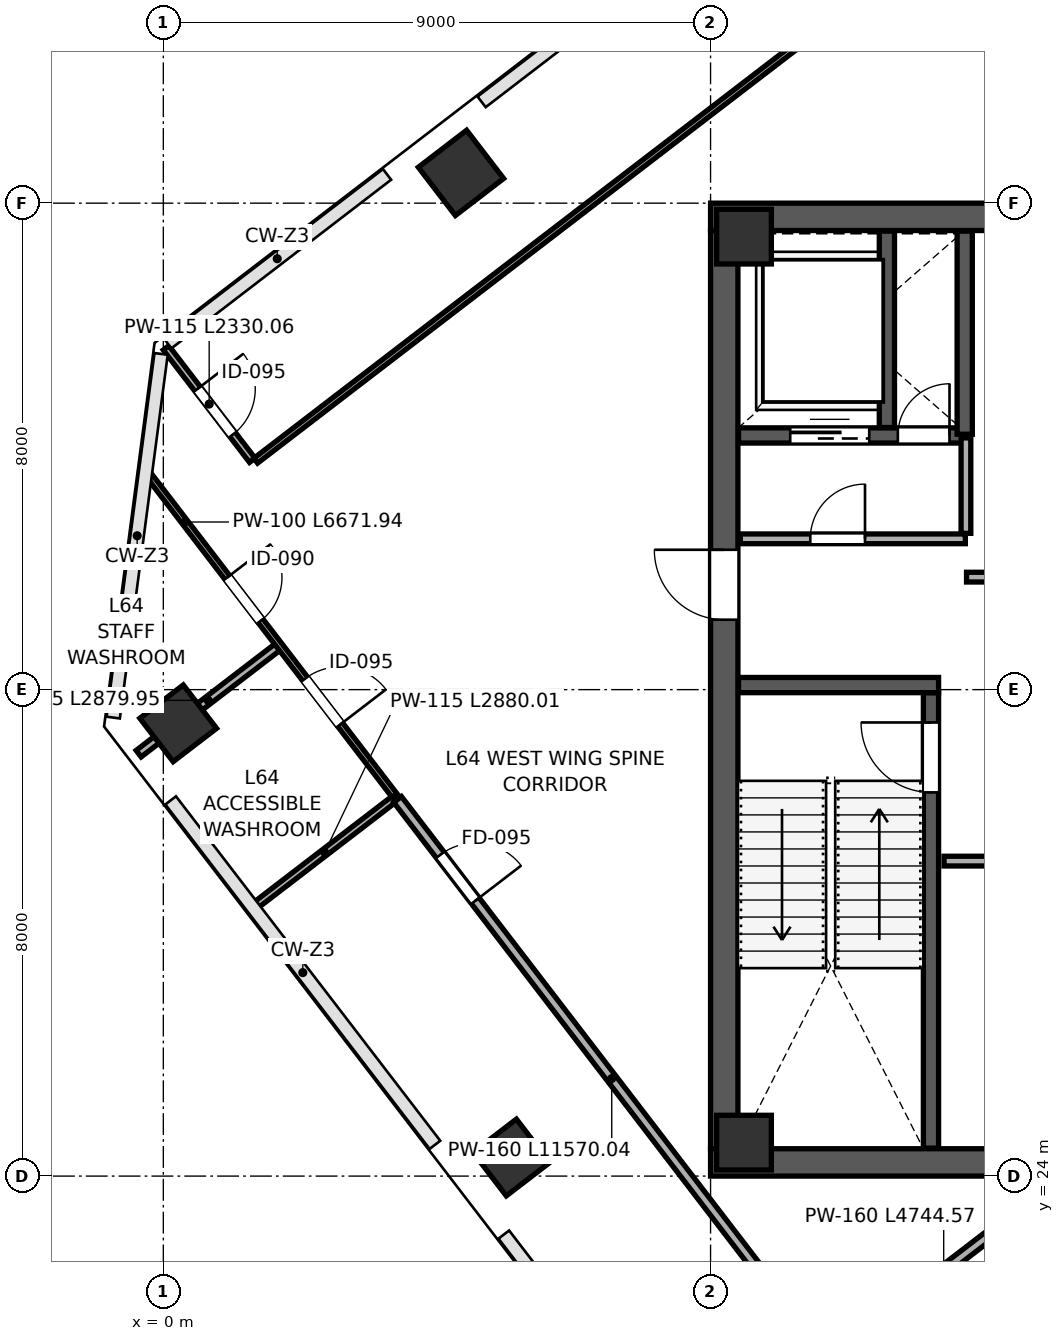
"""IFC4 building model, lengths in metres.
Left out: names, types, materials, properties, quantities, classifications, styles, units other than length and angle.
Written with IfcOpenShell. Run it as: python <this file> out.ifc"""

import sys

from ifc_helpers import new_model, si_unit, direction, frame, frame_2d, origin, origin_2d, place, context, subcontext, project, spatial, rectangle, extrude, source, transform, mapped, element, fill, save


model = new_model("IFC4")
c1 = context("Model", 3, precision=1e-05, world=origin(), true_north=direction((0.0, 1.0)))
c2 = subcontext(c1, "Body", "Model", "MODEL_VIEW")
j1 = project(units=[si_unit("LENGTHUNIT", "METRE"), si_unit("PLANEANGLEUNIT", "RADIAN")], contexts=[c1])
p1 = place(None, origin())
s1 = spatial("IfcSite", under=j1, at=p1, CompositionType="ELEMENT")
p2 = place(p1, origin())
s2 = spatial("IfcBuilding", under=s1, at=p2, CompositionType="ELEMENT")
p3 = place(p2, frame((0.0, 0.0, 283.6)))
s3 = spatial("IfcBuildingStorey", under=s2, at=p3, CompositionType="ELEMENT", Elevation=283.6)
m1 = source(origin(), c2, "Body", "SweptSolid", [
    extrude(rectangle(XDim=0.9, YDim=0.9, at=origin_2d()), origin(), (0.0, 0.0, 1.0), 4.198),
])
for number, where, z_axis, x_axis in (
    (1, (9.55, 24.55, 0.001), (0.0, 0.0, 1.0), (1.0, 0.0, 0.0)),
    (2, (9.55, 39.45, 0.001), (0.0, 0.0, 1.0), (1.0, 0.0, 0.0)),
):
    element("IfcColumn", number, at=place(p3, frame(where, z_axis=z_axis, x_axis=x_axis)), inside=s3, PredefinedType="COLUMN", context=c2, shape_type="MappedRepresentation", body=[
        mapped(m1, transform((0.0, 0.0, 0.0), scale=1.0)),
    ])
m2 = source(origin(), c2, "Body", "SweptSolid", [
    extrude(rectangle(XDim=0.9, YDim=0.9, at=origin_2d()), origin(), (0.0, 0.0, 1.0), 4.198),
])
for number, where, z_axis, x_axis in (
    (3, (0.245, 31.446, 0.001), (0.0, 0.0, 1.0), (-0.609, 0.793, 0.0)),
    (4, (5.724, 24.306, 0.001), (0.0, 0.0, 1.0), (-0.609, 0.793, 0.0)),
):
    element("IfcColumn", number, at=place(p3, frame(where, z_axis=z_axis, x_axis=x_axis)), inside=s3, PredefinedType="COLUMN", context=c2, shape_type="MappedRepresentation", body=[
        mapped(m2, transform((0.0, 0.0, 0.0), scale=1.0)),
    ])
m3 = source(origin(), c2, "Body", "SweptSolid", [
    extrude(rectangle(XDim=1.0, YDim=1.0, at=origin_2d()), origin(), (0.0, 0.0, 1.0), 4.198),
])
p4 = place(p3, frame((4.896, 40.498, 0.001), z_axis=(0.0, 0.0, 1.0), x_axis=(-0.608761429009, 0.793353340291, 0.0)))
e5 = element("IfcColumn", 5, at=p4, inside=s3, PredefinedType="COLUMN", context=c2, shape_type="MappedRepresentation", body=[
    mapped(m3, transform((0.0, 0.0, 0.0), scale=1.0)),
])
p5 = place(p3, frame((9.225, 24.45, 0.0), z_axis=(0.0, 0.0, 1.0), x_axis=(0.0, 1.0, 0.0)))
e6 = element("IfcWall", 6, at=p5, inside=s3, PredefinedType="SHEAR", context=c2, shape_type="SweptSolid", body=[
    extrude(rectangle(XDim=15.1, YDim=0.45, at=frame_2d((7.55, 0.0))), origin(), (0.0, 0.0, 1.0), 3.92),
])
p6 = place(p5, frame((8.7, 0.0, 0.0)))
e7 = element("IfcOpeningElement", 7, at=p6, cuts=e6, PredefinedType="OPENING", context=c2, shape_type="SweptSolid", body=[
    extrude(rectangle(XDim=1.15, YDim=2.2, at=frame_2d((0.575, 1.1))), frame((0.0, 0.235, 0.0), z_axis=(0.0, -1.0, 0.0), x_axis=(1.0, 0.0, 0.0)), (0.0, 0.0, 1.0), 0.47),
])
for number, where, z_axis, x_axis in (
    (8, (9.0, 24.225, 0.0), (0.0, 0.0, 1.0), (1.0, 0.0, 0.0)),
    (9, (9.0, 39.775, 0.0), (0.0, 0.0, 1.0), (1.0, 0.0, 0.0)),
):
    element("IfcWall", number, at=place(p3, frame(where, z_axis=z_axis, x_axis=x_axis)), inside=s3, PredefinedType="SHEAR", context=c2, shape_type="SweptSolid", body=[
        extrude(rectangle(XDim=18.0, YDim=0.45, at=frame_2d((9.0, 0.0))), origin(), (0.0, 0.0, 1.0), 3.92),
    ])
p7 = place(p3, frame((12.625, 24.46, 0.0), z_axis=(0.0, 0.0, 1.0), x_axis=(0.0, 1.0, 0.0)))
e10 = element("IfcWall", 10, at=p7, inside=s3, PredefinedType="SHEAR", context=c2, shape_type="SweptSolid", body=[
    extrude(rectangle(XDim=7.49, YDim=0.25, at=frame_2d((3.745, 0.0))), origin(), (0.0, 0.0, 1.0), 3.92),
])
p8 = place(p7, frame((5.85, 0.0, 0.0)))
e11 = element("IfcOpeningElement", 11, at=p8, cuts=e10, PredefinedType="OPENING", context=c2, shape_type="SweptSolid", body=[
    extrude(rectangle(XDim=1.15, YDim=2.2, at=frame_2d((0.575, 1.1))), frame((0.0, 0.135, 0.0), z_axis=(0.0, -1.0, 0.0), x_axis=(1.0, 0.0, 0.0)), (0.0, 0.0, 1.0), 0.27),
])
p9 = place(p3, frame((9.46, 32.075, 0.0), z_axis=(0.0, 0.0, 1.0), x_axis=(1.0, 0.0, 0.0)))
e12 = element("IfcWall", 12, at=p9, inside=s3, PredefinedType="SHEAR", context=c2, shape_type="SweptSolid", body=[
    extrude(rectangle(XDim=3.29, YDim=0.25, at=frame_2d((1.645, 0.0))), origin(), (0.0, 0.0, 1.0), 3.92),
])
p10 = place(p3, frame((9.46, 36.18, 0.0), z_axis=(0.0, 0.0, 1.0), x_axis=(1.0, 0.0, 0.0)))
e13 = element("IfcWall", 13, at=p10, inside=s3, PredefinedType="SHEAR", context=c2, shape_type="SweptSolid", body=[
    extrude(rectangle(XDim=3.79, YDim=0.25, at=frame_2d((1.895, 0.0))), origin(), (0.0, 0.0, 1.0), 3.92),
])
p11 = place(p10, frame((2.62, 0.0, 0.0)))
e14 = element("IfcOpeningElement", 14, at=p11, cuts=e13, PredefinedType="OPENING", context=c2, shape_type="SweptSolid", body=[
    extrude(rectangle(XDim=0.85, YDim=2.1, at=frame_2d((0.425, 1.05))), frame((0.0, 0.135, 0.0), z_axis=(0.0, -1.0, 0.0), x_axis=(1.0, 0.0, 0.0)), (0.0, 0.0, 1.0), 0.27),
])
p12 = place(p10, frame((0.85, 0.0, 0.0)))
e15 = element("IfcOpeningElement", 15, at=p12, cuts=e13, PredefinedType="OPENING", context=c2, shape_type="SweptSolid", body=[
    extrude(rectangle(XDim=1.3, YDim=2.25, at=frame_2d((0.65, 1.125))), frame((0.0, 0.135, 0.0), z_axis=(0.0, -1.0, 0.0), x_axis=(1.0, 0.0, 0.0)), (0.0, 0.0, 1.0), 0.27),
])
p13 = place(p3, frame((11.9, 36.31, 0.0), z_axis=(0.0, 0.0, 1.0), x_axis=(0.0, 1.0, 0.0)))
e16 = element("IfcWall", 16, at=p13, inside=s3, PredefinedType="SHEAR", context=c2, shape_type="SweptSolid", body=[
    extrude(rectangle(XDim=3.23, YDim=0.25, at=frame_2d((1.615, 0.0))), origin(), (0.0, 0.0, 1.0), 3.92),
])
p14 = place(p3, frame((13.18, 36.2, 0.0), z_axis=(0.0, 0.0, 1.0), x_axis=(0.0, 1.0, 0.0)))
e17 = element("IfcWall", 17, at=p14, inside=s3, PredefinedType="SHEAR", context=c2, shape_type="SweptSolid", body=[
    extrude(rectangle(XDim=3.34, YDim=0.25, at=frame_2d((1.67, 0.0))), origin(), (0.0, 0.0, 1.0), 3.92),
])
p15 = place(p3, frame((9.49, 34.48, 0.0), z_axis=(0.0, 0.0, 1.0), x_axis=(1.0, 0.0, 0.0)))
e18 = element("IfcWall", 18, at=p15, inside=s3, PredefinedType="PARTITIONING", context=c2, shape_type="SweptSolid", body=[
    extrude(rectangle(XDim=3.7, YDim=0.16, at=frame_2d((1.85, 0.0))), origin(), (0.0, 0.0, 1.0), 3.92),
])
p16 = place(p15, frame((1.15, 0.0, 0.0)))
e19 = element("IfcOpeningElement", 19, at=p16, cuts=e18, PredefinedType="OPENING", context=c2, shape_type="SweptSolid", body=[
    extrude(rectangle(XDim=0.9, YDim=2.15, at=frame_2d((0.45, 1.075))), frame((0.0, 0.09, 0.0), z_axis=(0.0, -1.0, 0.0), x_axis=(1.0, 0.0, 0.0)), (0.0, 0.0, 1.0), 0.18),
])
p17 = place(p3, frame((13.2, 34.57, 0.0), z_axis=(0.0, 0.0, 1.0), x_axis=(0.0, 1.0, 0.0)))
e20 = element("IfcWall", 20, at=p17, inside=s3, PredefinedType="PARTITIONING", context=c2, shape_type="SweptSolid", body=[
    extrude(rectangle(XDim=1.57, YDim=0.16, at=frame_2d((0.785, 0.0))), origin(), (0.0, 0.0, 1.0), 3.92),
])
p18 = place(p3, frame((13.21, 33.85, 0.0), z_axis=(0.0, 0.0, 1.0), x_axis=(1.0, 0.0, 0.0)))
e21 = element("IfcWall", 21, at=p18, inside=s3, PredefinedType="PARTITIONING", context=c2, shape_type="SweptSolid", body=[
    extrude(rectangle(XDim=4.1, YDim=0.16, at=frame_2d((2.05, 0.0))), origin(), (0.0, 0.0, 1.0), 3.92),
])
p19 = place(p18, frame((1.35, 0.0, 0.0)))
e22 = element("IfcOpeningElement", 22, at=p19, cuts=e21, PredefinedType="OPENING", context=c2, shape_type="SweptSolid", body=[
    extrude(rectangle(XDim=0.9, YDim=2.15, at=frame_2d((0.45, 1.075))), frame((0.0, 0.09, 0.0), z_axis=(0.0, -1.0, 0.0), x_axis=(1.0, 0.0, 0.0)), (0.0, 0.0, 1.0), 0.18),
])
p20 = place(p3, frame((12.84, 29.18, 0.0), z_axis=(0.0, 0.0, 1.0), x_axis=(1.0, 0.0, 0.0)))
e23 = element("IfcWall", 23, at=p20, inside=s3, PredefinedType="PARTITIONING", context=c2, shape_type="SweptSolid", body=[
    extrude(rectangle(XDim=8.37, YDim=0.16, at=frame_2d((4.185, 0.0))), origin(), (0.0, 0.0, 1.0), 3.92),
])
p21 = place(p20, frame((2.6, 0.0, 0.0)))
e24 = element("IfcOpeningElement", 24, at=p21, cuts=e23, PredefinedType="OPENING", context=c2, shape_type="SweptSolid", body=[
    extrude(rectangle(XDim=0.9, YDim=2.15, at=frame_2d((0.45, 1.075))), frame((0.0, 0.09, 0.0), z_axis=(0.0, -1.0, 0.0), x_axis=(1.0, 0.0, 0.0)), (0.0, 0.0, 1.0), 0.18),
])
p22 = place(p3, frame((-0.406, 30.947, 0.0), z_axis=(0.0, 0.0, 1.0), x_axis=(0.793370260172, 0.608739377956, 0.0)))
e25 = element("IfcWall", 25, at=p22, inside=s3, PredefinedType="PARTITIONING", context=c2, shape_type="SweptSolid", body=[
    extrude(rectangle(XDim=2.88, YDim=0.135, at=frame_2d((1.44, 0.0))), origin(), (0.0, 0.0, 1.0), 3.155),
])
p23 = place(p3, frame((1.512, 28.448, 0.0), z_axis=(0.0, 0.0, 1.0), x_axis=(0.793370260172, 0.608739377956, 0.0)))
e26 = element("IfcWall", 26, at=p23, inside=s3, PredefinedType="PARTITIONING", context=c2, shape_type="SweptSolid", body=[
    extrude(rectangle(XDim=2.88, YDim=0.115, at=frame_2d((1.44, 0.0))), origin(), (0.0, 0.0, 1.0), 3.155),
])
p24 = place(p3, frame((-0.258, 35.551, 0.0), z_axis=(0.0, 0.0, 1.0), x_axis=(0.608751837986, -0.79336069965, 0.0)))
e27 = element("IfcWall", 27, at=p24, inside=s3, PredefinedType="PARTITIONING", context=c2, shape_type="SweptSolid", body=[
    extrude(rectangle(XDim=6.672, YDim=0.1, at=frame_2d((3.336, 0.0))), origin(), (0.0, 0.0, 1.0), 3.92),
])
p25 = place(p24, frame((2.15, 0.0, 0.0)))
e28 = element("IfcOpeningElement", 28, at=p25, cuts=e27, PredefinedType="OPENING", context=c2, shape_type="SweptSolid", body=[
    extrude(rectangle(XDim=0.9, YDim=2.15, at=frame_2d((0.45, 1.075))), frame((0.0, 0.06, 0.0), z_axis=(0.0, -1.0, 0.0), x_axis=(1.0, 0.0, 0.0)), (0.0, 0.0, 1.0), 0.12),
])
p26 = place(p24, frame((4.25, 0.0, 0.0)))
e29 = element("IfcOpeningElement", 29, at=p26, cuts=e27, PredefinedType="OPENING", context=c2, shape_type="SweptSolid", body=[
    extrude(rectangle(XDim=0.95, YDim=2.15, at=frame_2d((0.475, 1.075))), frame((0.0, 0.06, 0.0), z_axis=(0.0, -1.0, 0.0), x_axis=(1.0, 0.0, 0.0)), (0.0, 0.0, 1.0), 0.12),
])
p27 = place(p3, frame((3.853, 30.194, 0.0), z_axis=(0.0, 0.0, 1.0), x_axis=(0.608748677634, -0.793363124603, 0.0)))
e30 = element("IfcWall", 30, at=p27, inside=s3, PredefinedType="PARTITIONING", context=c2, shape_type="SweptSolid", body=[
    extrude(rectangle(XDim=11.57, YDim=0.16, at=frame_2d((5.785, 0.0))), origin(), (0.0, 0.0, 1.0), 3.92),
])
p28 = place(p27, frame((1.15, 0.0, 0.0)))
e31 = element("IfcOpeningElement", 31, at=p28, cuts=e30, PredefinedType="OPENING", context=c2, shape_type="SweptSolid", body=[
    extrude(rectangle(XDim=0.95, YDim=2.15, at=frame_2d((0.475, 1.075))), frame((0.0, 0.09, 0.0), z_axis=(0.0, -1.0, 0.0), x_axis=(1.0, 0.0, 0.0)), (0.0, 0.0, 1.0), 0.18),
])
p29 = place(p3, frame((10.952, 21.007, 0.0), z_axis=(0.0, 0.0, 1.0), x_axis=(0.793369431695, 0.608740457709, 0.0)))
e32 = element("IfcWall", 32, at=p29, inside=s3, PredefinedType="PARTITIONING", context=c2, shape_type="SweptSolid", body=[
    extrude(rectangle(XDim=4.745, YDim=0.16, at=frame_2d((2.372, 0.0))), origin(), (0.0, 0.0, 1.0), 3.92),
])
p30 = place(p3, frame((0.045, 37.62, 0.0), z_axis=(0.0, 0.0, 1.0), x_axis=(0.60874824263, -0.793363458381, 0.0)))
e33 = element("IfcWall", 33, at=p30, inside=s3, PredefinedType="PARTITIONING", context=c2, shape_type="SweptSolid", body=[
    extrude(rectangle(XDim=2.33, YDim=0.115, at=frame_2d((1.165, 0.0))), origin(), (0.0, 0.0, 1.0), 3.92),
])
p31 = place(p30, frame((0.85, 0.0, 0.0)))
e34 = element("IfcOpeningElement", 34, at=p31, cuts=e33, PredefinedType="OPENING", context=c2, shape_type="SweptSolid", body=[
    extrude(rectangle(XDim=0.95, YDim=2.15, at=frame_2d((0.475, 1.075))), frame((0.0, 0.067, 0.0), z_axis=(0.0, -1.0, 0.0), x_axis=(1.0, 0.0, 0.0)), (0.0, 0.0, 1.0), 0.135),
])
p32 = place(p3, frame((1.519, 35.764, 0.0), z_axis=(0.0, 0.0, 1.0), x_axis=(0.793353184068, 0.608761632602, 0.0)))
e35 = element("IfcWall", 35, at=p32, inside=s3, PredefinedType="PARTITIONING", context=c2, shape_type="SweptSolid", body=[
    extrude(rectangle(XDim=27.572, YDim=0.1, at=frame_2d((13.786, 0.0))), origin(), (0.0, 0.0, 1.0), 3.92),
])
m4 = source(origin(), c2, "Body", "SweptSolid", [
    extrude(rectangle(XDim=1.15, YDim=2.2, at=frame_2d((0.575, 1.1))), frame((0.0, 0.025, 0.0), z_axis=(0.0, -1.0, 0.0), x_axis=(1.0, 0.0, 0.0)), (0.0, 0.0, 1.0), 0.05),
])
p33 = place(p8, origin())
e36 = element("IfcDoor", 36, at=p33, inside=s3, OperationType="SINGLE_SWING_RIGHT", PredefinedType="DOOR", context=c2, shape_type="MappedRepresentation", body=[
    mapped(m4, transform((0.0, 0.0, 0.0), scale=1.0)),
])
fill(e11, e36)
m5 = source(origin(), c2, "Body", "SweptSolid", [
    extrude(rectangle(XDim=1.15, YDim=2.2, at=frame_2d((0.575, 1.1))), frame((0.0, 0.025, 0.0), z_axis=(0.0, -1.0, 0.0), x_axis=(1.0, 0.0, 0.0)), (0.0, 0.0, 1.0), 0.05),
])
p34 = place(p6, origin())
e37 = element("IfcDoor", 37, at=p34, inside=s3, OperationType="SINGLE_SWING_RIGHT", PredefinedType="DOOR", context=c2, shape_type="MappedRepresentation", body=[
    mapped(m5, transform((0.0, 0.0, 0.0), scale=1.0)),
])
fill(e7, e37)
m6 = source(origin(), c2, "Body", "SweptSolid", [
    extrude(rectangle(XDim=0.85, YDim=2.1, at=frame_2d((0.425, 1.05))), frame((0.0, 0.025, 0.0), z_axis=(0.0, -1.0, 0.0), x_axis=(1.0, 0.0, 0.0)), (0.0, 0.0, 1.0), 0.05),
])
p35 = place(p11, origin())
e38 = element("IfcDoor", 38, at=p35, inside=s3, OperationType="SINGLE_SWING_RIGHT", PredefinedType="DOOR", context=c2, shape_type="MappedRepresentation", body=[
    mapped(m6, transform((0.0, 0.0, 0.0), scale=1.0)),
])
fill(e14, e38)
m7 = source(origin(), c2, "Body", "SweptSolid", [
    extrude(rectangle(XDim=1.3, YDim=2.25, at=frame_2d((0.65, 1.125))), frame((0.0, 0.025, 0.0), z_axis=(0.0, -1.0, 0.0), x_axis=(1.0, 0.0, 0.0)), (0.0, 0.0, 1.0), 0.05),
])
p36 = place(p12, origin())
e39 = element("IfcDoor", 39, at=p36, inside=s3, OperationType="SLIDING_TO_LEFT", PredefinedType="DOOR", context=c2, shape_type="MappedRepresentation", body=[
    mapped(m7, transform((0.0, 0.0, 0.0), scale=1.0)),
])
fill(e15, e39)
m8 = source(origin(), c2, "Body", "SweptSolid", [
    extrude(rectangle(XDim=0.9, YDim=2.15, at=frame_2d((0.45, 1.075))), frame((0.0, 0.025, 0.0), z_axis=(0.0, -1.0, 0.0), x_axis=(1.0, 0.0, 0.0)), (0.0, 0.0, 1.0), 0.05),
])
p37 = place(p16, origin())
e40 = element("IfcDoor", 40, at=p37, inside=s3, OperationType="SINGLE_SWING_RIGHT", PredefinedType="DOOR", context=c2, shape_type="MappedRepresentation", body=[
    mapped(m8, transform((0.0, 0.0, 0.0), scale=1.0)),
])
fill(e19, e40)
m9 = source(origin(), c2, "Body", "SweptSolid", [
    extrude(rectangle(XDim=0.9, YDim=2.15, at=frame_2d((0.45, 1.075))), frame((0.0, 0.025, 0.0), z_axis=(0.0, -1.0, 0.0), x_axis=(1.0, 0.0, 0.0)), (0.0, 0.0, 1.0), 0.05),
])
p38 = place(p25, origin())
e41 = element("IfcDoor", 41, at=p38, inside=s3, OperationType="SINGLE_SWING_LEFT", PredefinedType="DOOR", context=c2, shape_type="MappedRepresentation", body=[
    mapped(m9, transform((0.0, 0.0, 0.0), scale=1.0)),
])
fill(e28, e41)
m10 = source(origin(), c2, "Body", "SweptSolid", [
    extrude(rectangle(XDim=0.95, YDim=2.15, at=frame_2d((0.475, 1.075))), frame((0.0, 0.025, 0.0), z_axis=(0.0, -1.0, 0.0), x_axis=(1.0, 0.0, 0.0)), (0.0, 0.0, 1.0), 0.05),
])
p39 = place(p26, origin())
e42 = element("IfcDoor", 42, at=p39, inside=s3, OperationType="SINGLE_SWING_RIGHT", PredefinedType="DOOR", context=c2, shape_type="MappedRepresentation", body=[
    mapped(m10, transform((0.0, 0.0, 0.0), scale=1.0)),
])
fill(e29, e42)
m11 = source(origin(), c2, "Body", "SweptSolid", [
    extrude(rectangle(XDim=0.95, YDim=2.15, at=frame_2d((0.475, 1.075))), frame((0.0, 0.025, 0.0), z_axis=(0.0, -1.0, 0.0), x_axis=(1.0, 0.0, 0.0)), (0.0, 0.0, 1.0), 0.05),
])
p40 = place(p28, origin())
e43 = element("IfcDoor", 43, at=p40, inside=s3, OperationType="SINGLE_SWING_RIGHT", PredefinedType="DOOR", context=c2, shape_type="MappedRepresentation", body=[
    mapped(m11, transform((0.0, 0.0, 0.0), scale=1.0)),
])
fill(e31, e43)
p41 = place(p31, origin())
e44 = element("IfcDoor", 44, at=p41, inside=s3, OperationType="SINGLE_SWING_LEFT", PredefinedType="DOOR", context=c2, shape_type="MappedRepresentation", body=[
    mapped(m10, transform((0.0, 0.0, 0.0), scale=1.0)),
])
fill(e34, e44)
save(model, sys.argv[1])
